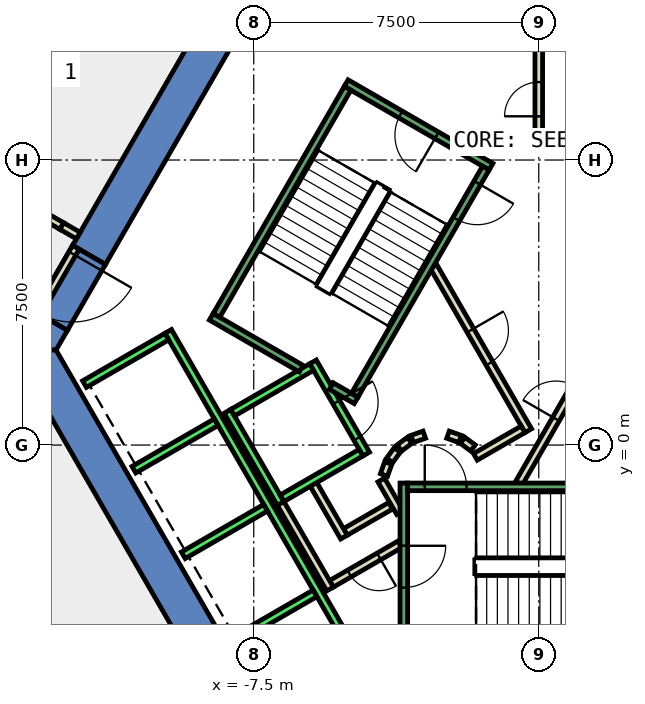
"""IFC4 building model, lengths in metres.
Left out: names, types, materials, properties, quantities, classifications, styles, units other than length and angle.
Written with IfcOpenShell. Run it as: python <this file> out.ifc"""

import sys

from ifc_helpers import new_model, si_unit, direction, frame, frame_2d, origin, place, context, subcontext, project, spatial, polyline, rectangle, outline, extrude, element, fill, save


model = new_model("IFC4")
c1 = context("Model", 3, precision=1e-05, world=origin(), true_north=direction((0.0, 1.0)))
c2 = subcontext(c1, "Body", "Model", "MODEL_VIEW")
j1 = project(units=[si_unit("LENGTHUNIT", "METRE"), si_unit("PLANEANGLEUNIT", "RADIAN")], contexts=[c1])
p1 = place(None, origin())
s1 = spatial("IfcSite", under=j1, at=p1, CompositionType="ELEMENT")
p2 = place(p1, origin())
s2 = spatial("IfcBuilding", under=s1, at=p2, CompositionType="ELEMENT")
p3 = place(p2, frame((0.0, 0.0, 64.4)))
s3 = spatial("IfcBuildingStorey", under=s2, at=p3, CompositionType="ELEMENT", Elevation=64.4)
p4 = place(p3, frame((0.0, 0.0, -0.4)))
e1 = element("IfcWall", 1, at=p4, inside=s3, PredefinedType="SHEAR", context=c2, shape_type="SweptSolid", body=[
    extrude(outline(polyline([(-12.267, 5.252), (-11.402, 4.752), (-6.351, 13.5), (-6.928, 14.5), (-12.267, 5.252)])), origin(), (0.0, 0.0, 1.0), 4.2),
])
p5 = place(p3, frame((0.0, 0.0, -0.4)))
e2 = element("IfcWall", 2, at=p5, inside=s3, PredefinedType="SHEAR", context=c2, shape_type="SweptSolid", body=[
    extrude(outline(polyline([(-12.402, 3.02), (-13.267, 3.52), (-13.856, 2.5), (-12.702, 2.5), (-12.402, 3.02)])), origin(), (0.0, 0.0, 1.0), 4.2),
])
p6 = place(p3, frame((0.0, 0.0, 3.6)))
e3 = element("IfcWall", 3, at=p6, inside=s3, PredefinedType="SHEAR", context=c2, shape_type="SweptSolid", body=[
    extrude(outline(polyline([(-13.267, 3.52), (-12.402, 3.02), (-11.402, 4.752), (-12.267, 5.252), (-13.267, 3.52)])), origin(), (0.0, 0.0, 1.0), 0.2),
])
p7 = place(p3, frame((0.0, 0.0, -0.4)))
e4 = element("IfcWall", 4, at=p7, inside=s3, PredefinedType="SHEAR", context=c2, shape_type="SweptSolid", body=[
    extrude(outline(polyline([(-13.856, 2.5), (-6.928, -9.5), (-6.351, -8.5), (-12.702, 2.5), (-13.856, 2.5)])), origin(), (0.0, 0.0, 1.0), 4.2),
])
p8 = place(p3, frame((-17.783, 8.783, 0.0), z_axis=(0.0, 0.0, 1.0), x_axis=(0.866041598752, -0.499971948444, 0.0)))
e5 = element("IfcWall", 5, at=p8, inside=s3, PredefinedType="PARTITIONING", context=c2, shape_type="SweptSolid", body=[
    extrude(rectangle(XDim=6.042, YDim=0.2, at=frame_2d((3.021, 0.0))), origin(), (0.0, 0.0, 1.0), 3.8),
])
p9 = place(p8, frame((2.771, 0.0, 0.0)))
e6 = element("IfcOpeningElement", 6, at=p9, cuts=e5, PredefinedType="OPENING", context=c2, shape_type="SweptSolid", body=[
    extrude(rectangle(XDim=1.0, YDim=2.1, at=frame_2d((0.5, 1.05))), frame((0.0, 0.11, 0.0), z_axis=(0.0, -1.0, 0.0), x_axis=(1.0, 0.0, 0.0)), (0.0, 0.0, 1.0), 0.22),
])
p10 = place(p3, frame((1.88, 7.8, 0.0), z_axis=(0.0, 0.0, 1.0), x_axis=(-1.0, 0.0, 0.0)))
e7 = element("IfcWall", 7, at=p10, inside=s3, PredefinedType="PARTITIONING", context=c2, shape_type="SweptSolid", body=[
    extrude(rectangle(XDim=1.78, YDim=0.2, at=frame_2d((0.89, 0.0))), origin(), (0.0, 0.0, 1.0), 3.8),
])
p11 = place(p3, frame((0.0, 7.7, 0.0), z_axis=(0.0, 0.0, 1.0), x_axis=(0.000325520816, 0.999999947018, 0.0)))
e8 = element("IfcWall", 8, at=p11, inside=s3, PredefinedType="PARTITIONING", context=c2, shape_type="SweptSolid", body=[
    extrude(rectangle(XDim=3.0, YDim=0.2, at=frame_2d((1.5, 0.0))), origin(), (0.0, 0.0, 1.0), 3.8),
])
p12 = place(p11, frame((0.95, 0.0, 0.0)))
e9 = element("IfcOpeningElement", 9, at=p12, cuts=e8, PredefinedType="OPENING", context=c2, shape_type="SweptSolid", body=[
    extrude(rectangle(XDim=0.9, YDim=2.1, at=frame_2d((0.45, 1.05))), frame((0.0, 0.11, 0.0), z_axis=(0.0, -1.0, 0.0), x_axis=(1.0, 0.0, 0.0)), (0.0, 0.0, 1.0), 0.22),
])
p13 = place(p3, frame((-3.9, -1.599, 0.0), z_axis=(0.0, 0.0, 1.0), x_axis=(-0.865969445389, -0.500096910261, 0.0)))
e10 = element("IfcWall", 10, at=p13, inside=s3, PredefinedType="PARTITIONING", context=c2, shape_type="SweptSolid", body=[
    extrude(rectangle(XDim=1.373, YDim=0.2, at=frame_2d((0.687, 0.0))), origin(), (0.0, 0.0, 1.0), 3.8),
])
p14 = place(p3, frame((-5.126, -2.422, 0.0), z_axis=(0.0, 0.0, 1.0), x_axis=(-0.500062241894, 0.865989465428, 0.0)))
e11 = element("IfcWall", 11, at=p14, inside=s3, PredefinedType="PARTITIONING", context=c2, shape_type="SweptSolid", body=[
    extrude(rectangle(XDim=1.7, YDim=0.2, at=frame_2d((0.85, 0.0))), origin(), (0.0, 0.0, 1.0), 3.8),
])
p15 = place(p3, frame((-3.65, -2.61, 0.0), z_axis=(0.0, 0.0, 1.0), x_axis=(-0.866072462134, -0.499918483688, 0.0)))
e12 = element("IfcWall", 12, at=p15, inside=s3, PredefinedType="PARTITIONING", context=c2, shape_type="SweptSolid", body=[
    extrude(rectangle(XDim=2.084, YDim=0.2, at=frame_2d((1.042, 0.0))), origin(), (0.0, 0.0, 1.0), 3.8),
])
p16 = place(p15, frame((0.642, 0.0, 0.0)))
e13 = element("IfcOpeningElement", 13, at=p16, cuts=e12, PredefinedType="OPENING", context=c2, shape_type="SweptSolid", body=[
    extrude(rectangle(XDim=0.9, YDim=2.1, at=frame_2d((0.45, 1.05))), frame((0.0, 0.11, 0.0), z_axis=(0.0, -1.0, 0.0), x_axis=(1.0, 0.0, 0.0)), (0.0, 0.0, 1.0), 0.22),
])
p17 = place(p3, frame((-5.492, -3.788, 0.0), z_axis=(0.0, 0.0, 1.0), x_axis=(-0.500008949224, 0.866020236886, 0.0)))
e14 = element("IfcWall", 14, at=p17, inside=s3, PredefinedType="PARTITIONING", context=c2, shape_type="SweptSolid", body=[
    extrude(rectangle(XDim=2.68, YDim=0.2, at=frame_2d((1.34, 0.0))), origin(), (0.0, 0.0, 1.0), 3.8),
])
p18 = place(p3, frame((-4.145, -0.92, 0.0), z_axis=(0.0, 0.0, 1.0), x_axis=(0.499743786207, -0.866173278362, 0.0)))
e15 = element("IfcWall", 15, at=p18, inside=s3, PredefinedType="PARTITIONING", context=c2, shape_type="SweptSolid", body=[
    extrude(rectangle(XDim=0.991, YDim=0.2, at=frame_2d((0.495, 0.0))), origin(), (0.0, 0.0, 1.0), 3.8),
])
p19 = place(p3, frame((-0.52, -1.0, 0.0), z_axis=(0.0, 0.0, 1.0), x_axis=(0.50011622646, 0.865958290007, 0.0)))
e16 = element("IfcWall", 16, at=p19, inside=s3, PredefinedType="PARTITIONING", context=c2, shape_type="SweptSolid", body=[
    extrude(rectangle(XDim=4.991, YDim=0.2, at=frame_2d((2.496, 0.0))), origin(), (0.0, 0.0, 1.0), 3.8),
])
p20 = place(p19, frame((1.945, 0.0, 0.0)))
e17 = element("IfcOpeningElement", 17, at=p20, cuts=e16, PredefinedType="OPENING", context=c2, shape_type="SweptSolid", body=[
    extrude(rectangle(XDim=1.0, YDim=2.1, at=frame_2d((0.5, 1.05))), frame((0.0, 0.11, 0.0), z_axis=(0.0, -1.0, 0.0), x_axis=(1.0, 0.0, 0.0)), (0.0, 0.0, 1.0), 0.22),
])
p21 = place(p3, frame((-2.771, 4.7, 0.0), z_axis=(0.0, 0.0, 1.0), x_axis=(0.499969479948, -0.866043023828, 0.0)))
e18 = element("IfcWall", 18, at=p21, inside=s3, PredefinedType="PARTITIONING", context=c2, shape_type="SweptSolid", body=[
    extrude(rectangle(XDim=4.99, YDim=0.2, at=frame_2d((2.495, 0.0))), origin(), (0.0, 0.0, 1.0), 3.8),
])
p22 = place(p21, frame((1.945, 0.0, 0.0)))
e19 = element("IfcOpeningElement", 19, at=p22, cuts=e18, PredefinedType="OPENING", context=c2, shape_type="SweptSolid", body=[
    extrude(rectangle(XDim=1.0, YDim=2.1, at=frame_2d((0.5, 1.05))), frame((0.0, 0.11, 0.0), z_axis=(0.0, -1.0, 0.0), x_axis=(1.0, 0.0, 0.0)), (0.0, 0.0, 1.0), 0.22),
])
p23 = place(p3, frame((-0.412, 0.414, 0.0), z_axis=(0.0, 0.0, 1.0), x_axis=(-0.866017369001, -0.500013916395, 0.0)))
e20 = element("IfcWall", 20, at=p23, inside=s3, PredefinedType="PARTITIONING", context=c2, shape_type="SweptSolid", body=[
    extrude(rectangle(XDim=1.45, YDim=0.2, at=frame_2d((0.725, 0.0))), origin(), (0.0, 0.0, 1.0), 3.8),
])
p24 = place(p3, frame((-1.731, -0.077, 0.0), z_axis=(0.0, 0.0, 1.0), x_axis=(-0.804311165252, 0.594208338422, 0.0)))
e21 = element("IfcWall", 21, at=p24, inside=s3, PredefinedType="PARTITIONING", context=c2, shape_type="SweptSolid", body=[
    extrude(rectangle(XDim=0.338, YDim=0.2, at=frame_2d((0.169, 0.0))), origin(), (0.0, 0.0, 1.0), 3.8),
])
p25 = place(p3, frame((-2.07, 0.16, 0.0), z_axis=(0.0, 0.0, 1.0), x_axis=(-0.942199461132, 0.335052496547, 0.0)))
e22 = element("IfcWall", 22, at=p25, inside=s3, PredefinedType="PARTITIONING", context=c2, shape_type="SweptSolid", body=[
    extrude(rectangle(XDim=0.337, YDim=0.2, at=frame_2d((0.169, 0.0))), origin(), (0.0, 0.0, 1.0), 3.8),
])
p26 = place(p3, frame((-3.012, 0.273, 0.0), z_axis=(0.0, 0.0, 1.0), x_axis=(-0.942280615813, -0.334824194261, 0.0)))
e23 = element("IfcWall", 23, at=p26, inside=s3, PredefinedType="PARTITIONING", context=c2, shape_type="SweptSolid", body=[
    extrude(rectangle(XDim=0.338, YDim=0.2, at=frame_2d((0.169, 0.0))), origin(), (0.0, 0.0, 1.0), 3.8),
])
p27 = place(p3, frame((-3.397, 0.124, 0.0), z_axis=(0.0, 0.0, 1.0), x_axis=(-0.804311165252, -0.594208338422, 0.0)))
e24 = element("IfcWall", 24, at=p27, inside=s3, PredefinedType="PARTITIONING", context=c2, shape_type="SweptSolid", body=[
    extrude(rectangle(XDim=0.338, YDim=0.2, at=frame_2d((0.169, 0.0))), origin(), (0.0, 0.0, 1.0), 3.8),
])
p28 = place(p3, frame((-3.723, -0.131, 0.0), z_axis=(0.0, 0.0, 1.0), x_axis=(-0.594675113454, -0.803966112121, 0.0)))
e25 = element("IfcWall", 25, at=p28, inside=s3, PredefinedType="PARTITIONING", context=c2, shape_type="SweptSolid", body=[
    extrude(rectangle(XDim=0.338, YDim=0.2, at=frame_2d((0.169, 0.0))), origin(), (0.0, 0.0, 1.0), 3.8),
])
p29 = place(p3, frame((-3.96, -0.47, 0.0), z_axis=(0.0, 0.0, 1.0), x_axis=(-0.334824194261, -0.942280615813, 0.0)))
e26 = element("IfcWall", 26, at=p29, inside=s3, PredefinedType="PARTITIONING", context=c2, shape_type="SweptSolid", body=[
    extrude(rectangle(XDim=0.338, YDim=0.2, at=frame_2d((0.169, 0.0))), origin(), (0.0, 0.0, 1.0), 3.8),
])
p30 = place(p3, frame((-12.18, 5.202, 0.0), z_axis=(0.0, 0.0, 1.0), x_axis=(-0.50002537861, -0.866010750942, 0.0)))
e27 = element("IfcWall", 27, at=p30, inside=s3, PredefinedType="PARTITIONING", context=c2, shape_type="SweptSolid", body=[
    extrude(rectangle(XDim=2.0, YDim=0.2, at=frame_2d((1.0, 0.0))), origin(), (0.0, 0.0, 1.0), 2.4),
])
p31 = place(p30, frame((0.19, 0.0, 0.0)))
e28 = element("IfcOpeningElement", 28, at=p31, cuts=e27, PredefinedType="OPENING", context=c2, shape_type="SweptSolid", body=[
    extrude(rectangle(XDim=1.8, YDim=2.1, at=frame_2d((0.9, 1.05))), frame((0.0, 0.11, 0.0), z_axis=(0.0, -1.0, 0.0), x_axis=(1.0, 0.0, 0.0)), (0.0, 0.0, 1.0), 0.22),
])
p32 = place(p3, frame((-12.55, 5.762, 0.0), z_axis=(0.0, 0.0, 1.0), x_axis=(0.866071776036, -0.499919672301, 0.0)))
e29 = element("IfcWall", 29, at=p32, inside=s3, PredefinedType="PARTITIONING", context=c2, shape_type="SweptSolid", body=[
    extrude(rectangle(XDim=0.5, YDim=0.2, at=frame_2d((0.25, 0.0))), origin(), (0.0, 0.0, 1.0), 2.4),
])
p33 = place(p3, frame((-5.94, 2.188, 0.0), z_axis=(0.0, 0.0, 1.0), x_axis=(0.49994636267, -0.866056369097, 0.0)))
e30 = element("IfcWall", 30, at=p33, inside=s3, PredefinedType="STANDARD", context=c2, shape_type="SweptSolid", body=[
    extrude(rectangle(XDim=2.8, YDim=0.2, at=frame_2d((1.4, 0.0))), origin(), (0.0, 0.0, 1.0), 3.8),
])
p34 = place(p33, frame((1.225, 0.0, 0.0)))
e31 = element("IfcOpeningElement", 31, at=p34, cuts=e30, PredefinedType="OPENING", context=c2, shape_type="SweptSolid", body=[
    extrude(rectangle(XDim=1.1, YDim=2.1, at=frame_2d((0.55, 1.05))), frame((0.0, 0.11, 0.0), z_axis=(0.0, -1.0, 0.0), x_axis=(1.0, 0.0, 0.0)), (0.0, 0.0, 1.0), 0.22),
])
p35 = place(p3, frame((-8.192, 0.888, 0.0), z_axis=(0.0, 0.0, 1.0), x_axis=(0.49994636267, -0.866056369097, 0.0)))
e32 = element("IfcWall", 32, at=p35, inside=s3, PredefinedType="STANDARD", context=c2, shape_type="SweptSolid", body=[
    extrude(rectangle(XDim=2.8, YDim=0.2, at=frame_2d((1.4, 0.0))), origin(), (0.0, 0.0, 1.0), 3.8),
])
for number, where, z_axis, x_axis in (
    (33, (-5.977, 2.052, 0.0), (0.0, 0.0, 1.0), (-0.866, -0.5, 0.0)),
    (34, (-4.677, -0.2, 0.0), (0.0, 0.0, 1.0), (-0.866, -0.5, 0.0)),
):
    element("IfcWall", number, at=place(p3, frame(where, z_axis=z_axis, x_axis=x_axis)), inside=s3, PredefinedType="STANDARD", context=c2, shape_type="SweptSolid", body=[
        extrude(rectangle(XDim=2.399, YDim=0.2, at=frame_2d((1.2, 0.0))), origin(), (0.0, 0.0, 1.0), 3.8),
    ])
p36 = place(p3, frame((-9.751, 2.99, 0.0), z_axis=(0.0, 0.0, 1.0), x_axis=(0.50000090737, -0.866024879913, 0.0)))
e35 = element("IfcWall", 35, at=p36, inside=s3, PredefinedType="STANDARD", context=c2, shape_type="SweptSolid", body=[
    extrude(rectangle(XDim=10.6, YDim=0.2, at=frame_2d((5.3, 0.0))), origin(), (0.0, 0.0, 1.0), 3.8),
])
p37 = place(p3, frame((-9.788, 2.853, 0.0), z_axis=(0.0, 0.0, 1.0), x_axis=(-0.865998541277, -0.500046524342, 0.0)))
e36 = element("IfcWall", 36, at=p37, inside=s3, PredefinedType="STANDARD", context=c2, shape_type="SweptSolid", body=[
    extrude(rectangle(XDim=2.5, YDim=0.2, at=frame_2d((1.25, 0.0))), origin(), (0.0, 0.0, 1.0), 3.8),
])
for number, where, z_axis, x_axis in (
    (37, (-8.488, 0.602, 0.0), (0.0, 0.0, 1.0), (-0.866, -0.5, 0.0)),
    (38, (-7.188, -1.65, 0.0), (0.0, 0.0, 1.0), (-0.866, -0.5, 0.0)),
    (39, (-5.888, -3.902, 0.0), (0.0, 0.0, 1.0), (-0.866, -0.5, 0.0)),
):
    element("IfcWall", number, at=place(p3, frame(where, z_axis=z_axis, x_axis=x_axis)), inside=s3, PredefinedType="STANDARD", context=c2, shape_type="SweptSolid", body=[
        extrude(rectangle(XDim=2.5, YDim=0.2, at=frame_2d((1.25, 0.0))), origin(), (0.0, 0.0, 1.0), 3.8),
    ])
p38 = place(p3, frame((-3.55, -1.0, 0.0), z_axis=(0.0, 0.0, 1.0), x_axis=(0.0, -1.0, 0.0)))
e40 = element("IfcWall", 40, at=p38, inside=s3, PredefinedType="STANDARD", context=c2, shape_type="SweptSolid", body=[
    extrude(rectangle(XDim=4.4, YDim=0.2, at=frame_2d((2.2, 0.0))), origin(), (0.0, 0.0, 1.0), 3.8),
])
p39 = place(p38, frame((1.65, 0.0, 0.0)))
e41 = element("IfcOpeningElement", 41, at=p39, cuts=e40, PredefinedType="OPENING", context=c2, shape_type="SweptSolid", body=[
    extrude(rectangle(XDim=1.1, YDim=2.2, at=frame_2d((0.55, 1.1))), frame((0.0, 0.11, 0.0), z_axis=(0.0, -1.0, 0.0), x_axis=(1.0, 0.0, 0.0)), (0.0, 0.0, 1.0), 0.22),
])
p40 = place(p3, frame((-3.45, -1.1, 0.0), z_axis=(0.0, 0.0, 1.0), x_axis=(1.0, 0.0, 0.0)))
e42 = element("IfcWall", 42, at=p40, inside=s3, PredefinedType="STANDARD", context=c2, shape_type="SweptSolid", body=[
    extrude(rectangle(XDim=6.9, YDim=0.2, at=frame_2d((3.45, 0.0))), origin(), (0.0, 0.0, 1.0), 3.8),
])
p41 = place(p40, frame((0.45, 0.0, 0.0)))
e43 = element("IfcOpeningElement", 43, at=p41, cuts=e42, PredefinedType="OPENING", context=c2, shape_type="SweptSolid", body=[
    extrude(rectangle(XDim=1.1, YDim=2.2, at=frame_2d((0.55, 1.1))), frame((0.0, 0.11, 0.0), z_axis=(0.0, -1.0, 0.0), x_axis=(1.0, 0.0, 0.0)), (0.0, 0.0, 1.0), 0.22),
])
p42 = place(p3, frame((-1.256, 7.324, 0.0), z_axis=(0.0, 0.0, 1.0), x_axis=(-0.866046073146, 0.499964197906, 0.0)))
e44 = element("IfcWall", 44, at=p42, inside=s3, PredefinedType="STANDARD", context=c2, shape_type="SweptSolid", body=[
    extrude(rectangle(XDim=4.4, YDim=0.2, at=frame_2d((2.2, 0.0))), origin(), (0.0, 0.0, 1.0), 3.8),
])
p43 = place(p42, frame((1.65, 0.0, 0.0)))
e45 = element("IfcOpeningElement", 45, at=p43, cuts=e44, PredefinedType="OPENING", context=c2, shape_type="SweptSolid", body=[
    extrude(rectangle(XDim=1.1, YDim=2.2, at=frame_2d((0.55, 1.1))), frame((0.0, 0.11, 0.0), z_axis=(0.0, -1.0, 0.0), x_axis=(1.0, 0.0, 0.0)), (0.0, 0.0, 1.0), 0.22),
])
p44 = place(p3, frame((-6.25, 2.01, 0.0), z_axis=(0.0, 0.0, 1.0), x_axis=(-0.86611865017, 0.499838457731, 0.0)))
e46 = element("IfcWall", 46, at=p44, inside=s3, PredefinedType="STANDARD", context=c2, shape_type="SweptSolid", body=[
    extrude(rectangle(XDim=2.733, YDim=0.2, at=frame_2d((1.366, 0.0))), origin(), (0.0, 0.0, 1.0), 3.8),
])
p45 = place(p3, frame((-4.806, 1.176, 0.0), z_axis=(0.0, 0.0, 1.0), x_axis=(-0.866558586415, 0.499075361355, 0.0)))
e47 = element("IfcWall", 47, at=p45, inside=s3, PredefinedType="STANDARD", context=c2, shape_type="SweptSolid", body=[
    extrude(rectangle(XDim=0.751, YDim=0.2, at=frame_2d((0.376, 0.0))), origin(), (0.0, 0.0, 1.0), 3.8),
])
p46 = place(p3, frame((-1.393, 7.288, 0.0), z_axis=(0.0, 0.0, 1.0), x_axis=(-0.499963383562, -0.866046543262, 0.0)))
e48 = element("IfcWall", 48, at=p46, inside=s3, PredefinedType="STANDARD", context=c2, shape_type="SweptSolid", body=[
    extrude(rectangle(XDim=6.9, YDim=0.2, at=frame_2d((3.45, 0.0))), origin(), (0.0, 0.0, 1.0), 3.8),
])
p47 = place(p46, frame((0.45, 0.0, 0.0)))
e49 = element("IfcOpeningElement", 49, at=p47, cuts=e48, PredefinedType="OPENING", context=c2, shape_type="SweptSolid", body=[
    extrude(rectangle(XDim=1.1, YDim=2.2, at=frame_2d((0.55, 1.1))), frame((0.0, 0.11, 0.0), z_axis=(0.0, -1.0, 0.0), x_axis=(1.0, 0.0, 0.0)), (0.0, 0.0, 1.0), 0.22),
])
p48 = place(p3, frame((-5.03, 9.388, 0.0), z_axis=(0.0, 0.0, 1.0), x_axis=(-0.499978703459, -0.866037698999, 0.0)))
e50 = element("IfcWall", 50, at=p48, inside=s3, PredefinedType="STANDARD", context=c2, shape_type="SweptSolid", body=[
    extrude(rectangle(XDim=6.9, YDim=0.2, at=frame_2d((3.45, 0.0))), origin(), (0.0, 0.0, 1.0), 3.8),
])
p49 = place(p20, origin())
e51 = element("IfcDoor", 51, at=p49, inside=s3, OperationType="SINGLE_SWING_LEFT", PredefinedType="DOOR", context=c2, shape_type="SweptSolid", body=[
    extrude(rectangle(XDim=1.0, YDim=2.1, at=frame_2d((0.5, 1.05))), frame((0.0, 0.025, 0.0), z_axis=(0.0, -1.0, 0.0), x_axis=(1.0, 0.0, 0.0)), (0.0, 0.0, 1.0), 0.05),
])
fill(e17, e51)
p50 = place(p22, origin())
e52 = element("IfcDoor", 52, at=p50, inside=s3, OperationType="SINGLE_SWING_RIGHT", PredefinedType="DOOR", context=c2, shape_type="SweptSolid", body=[
    extrude(rectangle(XDim=1.0, YDim=2.1, at=frame_2d((0.5, 1.05))), frame((0.0, 0.025, 0.0), z_axis=(0.0, -1.0, 0.0), x_axis=(1.0, 0.0, 0.0)), (0.0, 0.0, 1.0), 0.05),
])
fill(e19, e52)
p51 = place(p12, origin())
e53 = element("IfcDoor", 53, at=p51, inside=s3, OperationType="SINGLE_SWING_RIGHT", PredefinedType="DOOR", context=c2, shape_type="SweptSolid", body=[
    extrude(rectangle(XDim=0.9, YDim=2.1, at=frame_2d((0.45, 1.05))), frame((0.0, 0.025, 0.0), z_axis=(0.0, -1.0, 0.0), x_axis=(1.0, 0.0, 0.0)), (0.0, 0.0, 1.0), 0.05),
])
fill(e9, e53)
p52 = place(p16, origin())
e54 = element("IfcDoor", 54, at=p52, inside=s3, OperationType="SINGLE_SWING_LEFT", PredefinedType="DOOR", context=c2, shape_type="SweptSolid", body=[
    extrude(rectangle(XDim=0.9, YDim=2.1, at=frame_2d((0.45, 1.05))), frame((0.0, 0.025, 0.0), z_axis=(0.0, -1.0, 0.0), x_axis=(1.0, 0.0, 0.0)), (0.0, 0.0, 1.0), 0.05),
])
fill(e13, e54)
p53 = place(p31, origin())
e55 = element("IfcDoor", 55, at=p53, inside=s3, OperationType="DOUBLE_DOOR_SINGLE_SWING", PredefinedType="DOOR", context=c2, shape_type="SweptSolid", body=[
    extrude(rectangle(XDim=1.8, YDim=2.1, at=frame_2d((0.9, 1.05))), frame((0.0, 0.025, 0.0), z_axis=(0.0, -1.0, 0.0), x_axis=(1.0, 0.0, 0.0)), (0.0, 0.0, 1.0), 0.05),
])
fill(e28, e55)
p54 = place(p34, origin())
e56 = element("IfcDoor", 56, at=p54, inside=s3, OperationType="SLIDING_TO_LEFT", PredefinedType="DOOR", context=c2, shape_type="SweptSolid", body=[
    extrude(rectangle(XDim=1.1, YDim=2.1, at=frame_2d((0.55, 1.05))), frame((0.0, 0.025, 0.0), z_axis=(0.0, -1.0, 0.0), x_axis=(1.0, 0.0, 0.0)), (0.0, 0.0, 1.0), 0.05),
])
fill(e31, e56)
p55 = place(p41, origin())
e57 = element("IfcDoor", 57, at=p55, inside=s3, OperationType="SINGLE_SWING_LEFT", PredefinedType="DOOR", context=c2, shape_type="SweptSolid", body=[
    extrude(rectangle(XDim=1.1, YDim=2.2, at=frame_2d((0.55, 1.1))), frame((0.0, 0.025, 0.0), z_axis=(0.0, -1.0, 0.0), x_axis=(1.0, 0.0, 0.0)), (0.0, 0.0, 1.0), 0.05),
])
fill(e43, e57)
p56 = place(p39, origin())
e58 = element("IfcDoor", 58, at=p56, inside=s3, OperationType="SINGLE_SWING_LEFT", PredefinedType="DOOR", context=c2, shape_type="SweptSolid", body=[
    extrude(rectangle(XDim=1.1, YDim=2.2, at=frame_2d((0.55, 1.1))), frame((0.0, 0.025, 0.0), z_axis=(0.0, -1.0, 0.0), x_axis=(1.0, 0.0, 0.0)), (0.0, 0.0, 1.0), 0.05),
])
fill(e41, e58)
p57 = place(p47, origin())
e59 = element("IfcDoor", 59, at=p57, inside=s3, OperationType="SINGLE_SWING_LEFT", PredefinedType="DOOR", context=c2, shape_type="SweptSolid", body=[
    extrude(rectangle(XDim=1.1, YDim=2.2, at=frame_2d((0.55, 1.1))), frame((0.0, 0.025, 0.0), z_axis=(0.0, -1.0, 0.0), x_axis=(1.0, 0.0, 0.0)), (0.0, 0.0, 1.0), 0.05),
])
fill(e49, e59)
p58 = place(p43, origin())
e60 = element("IfcDoor", 60, at=p58, inside=s3, OperationType="SINGLE_SWING_LEFT", PredefinedType="DOOR", context=c2, shape_type="SweptSolid", body=[
    extrude(rectangle(XDim=1.1, YDim=2.2, at=frame_2d((0.55, 1.1))), frame((0.0, 0.025, 0.0), z_axis=(0.0, -1.0, 0.0), x_axis=(1.0, 0.0, 0.0)), (0.0, 0.0, 1.0), 0.05),
])
fill(e45, e60)
save(model, sys.argv[1])
